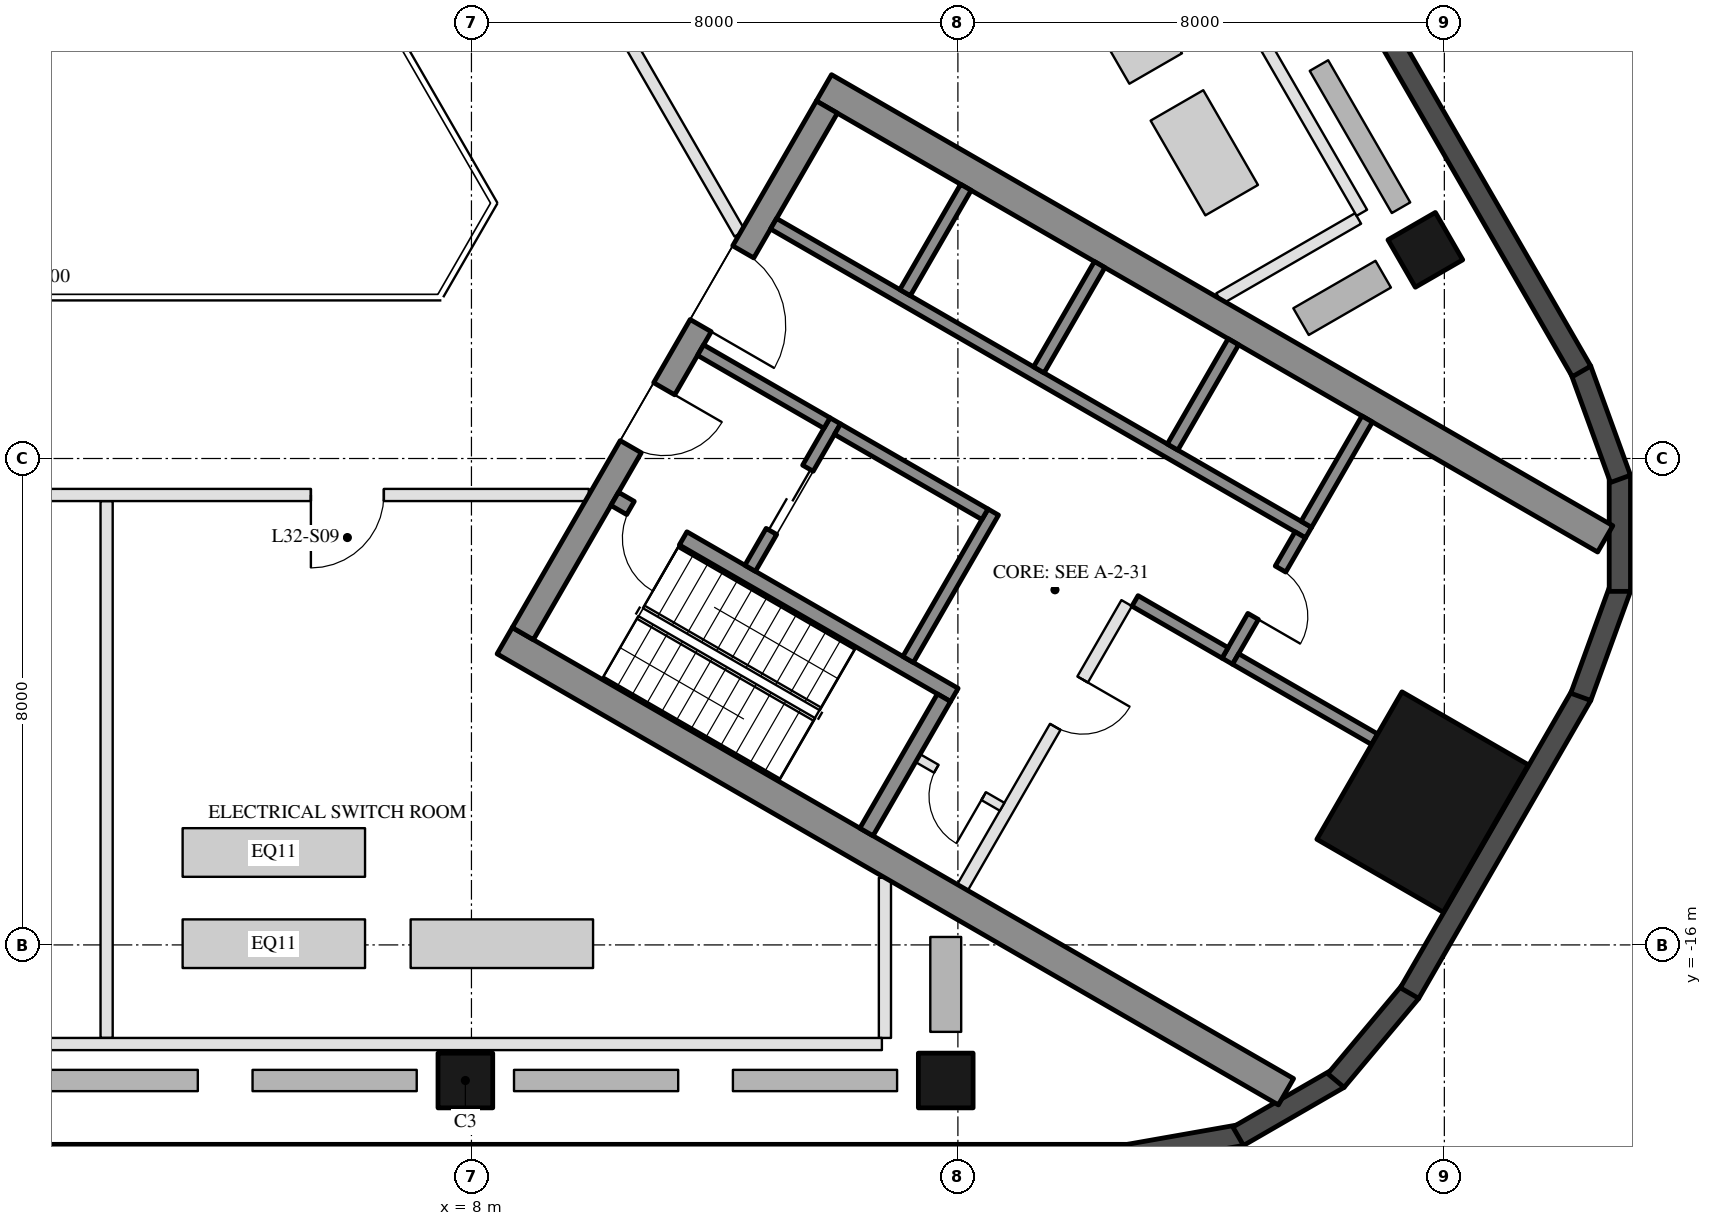
"""IFC4 building model, lengths in metres.
Left out: names, types, materials, properties, quantities, classifications, styles, units other than length and angle.
Written with IfcOpenShell. Run it as: python <this file> out.ifc"""

import sys

from ifc_helpers import new_model, si_unit, direction, frame, frame_2d, origin, origin_2d, place, context, subcontext, project, spatial, rectangle, hollow_rectangle, extrude, element, fill, save


model = new_model("IFC4")
c1 = context("Model", 3, precision=1e-05, world=origin(), true_north=direction((0.0, 1.0)))
c2 = subcontext(c1, "Body", "Model", "MODEL_VIEW")
j1 = project(units=[si_unit("LENGTHUNIT", "METRE"), si_unit("PLANEANGLEUNIT", "RADIAN")], contexts=[c1])
p1 = place(None, origin())
s1 = spatial("IfcSite", under=j1, at=p1, CompositionType="ELEMENT")
p2 = place(p1, origin())
s2 = spatial("IfcBuilding", under=s1, at=p2, CompositionType="ELEMENT")
p3 = place(p2, frame((0.0, 0.0, 137.6)))
s3 = spatial("IfcBuildingStorey", under=s2, at=p3, CompositionType="ELEMENT", Elevation=137.6)
for number, where, z_axis, x_axis in (
    (1, (7.9, -18.23, 0.0), (0.0, 0.0, 1.0), (-1.0, 0.0, 0.0)),
    (2, (15.8, -18.23, 0.0), (0.0, 0.0, 1.0), (-1.0, 0.0, 0.0)),
    (3, (23.688, -4.568, 0.0), (0.0, 0.0, 1.0), (-0.5, 0.866, 0.0)),
):
    element("IfcColumn", number, at=place(p3, frame(where, z_axis=z_axis, x_axis=x_axis)), inside=s3, PredefinedType="COLUMN", context=c2, shape_type="SweptSolid", body=[
        extrude(hollow_rectangle(XDim=0.9, YDim=0.9, WallThickness=0.04, at=origin_2d()), origin(), (0.0, 0.0, 1.0), 4.5),
    ])
p4 = place(p3, frame((23.643, -13.65, 0.0), z_axis=(0.0, 0.0, 1.0), x_axis=(0.5, 0.866025403784, 0.0)))
e4 = element("IfcColumn", 4, at=p4, inside=s3, PredefinedType="COLUMN", context=c2, shape_type="SweptSolid", body=[
    extrude(hollow_rectangle(XDim=2.8, YDim=2.4, WallThickness=0.07, at=origin_2d()), origin(), (0.0, 0.0, 1.0), 4.5),
])
p5 = place(p3, frame((-18.816, -19.455, 0.0), z_axis=(0.0, 0.0, 1.0), x_axis=(1.0, 0.0, 0.0)))
e5 = element("IfcWall", 5, at=p5, inside=s3, PredefinedType="SOLIDWALL", context=c2, shape_type="SweptSolid", body=[
    extrude(rectangle(XDim=37.632, YDim=0.35, at=frame_2d((18.816, 0.0))), origin(), (0.0, 0.0, 1.0), 4.2),
])
p6 = place(p3, frame((18.785, -19.458, 0.0), z_axis=(0.0, 0.0, 1.0), x_axis=(0.984798995425, 0.173697837091, 0.0)))
e6 = element("IfcWall", 6, at=p6, inside=s3, PredefinedType="SOLIDWALL", context=c2, shape_type="SweptSolid", body=[
    extrude(rectangle(XDim=1.91, YDim=0.35, at=frame_2d((0.955, 0.0))), origin(), (0.0, 0.0, 1.0), 4.2),
])
for number, where, z_axis, x_axis in (
    (7, (20.61, -19.147, 0.0), (0.0, 0.0, 1.0), (0.866, 0.5, 0.0)),
    (8, (22.217, -18.231, 0.0), (0.0, 0.0, 1.0), (0.643, 0.766, 0.0)),
):
    element("IfcWall", number, at=place(p3, frame(where, z_axis=z_axis, x_axis=x_axis)), inside=s3, PredefinedType="SOLIDWALL", context=c2, shape_type="SweptSolid", body=[
        extrude(rectangle(XDim=1.91, YDim=0.35, at=frame_2d((0.955, 0.0))), origin(), (0.0, 0.0, 1.0), 4.2),
    ])
p7 = place(p3, frame((23.427, -16.792, 0.0), z_axis=(0.0, 0.0, 1.0), x_axis=(0.499986410639, 0.866033249463, 0.0)))
e9 = element("IfcWall", 9, at=p7, inside=s3, PredefinedType="SOLIDWALL", context=c2, shape_type="SweptSolid", body=[
    extrude(rectangle(XDim=5.658, YDim=0.35, at=frame_2d((2.829, 0.0))), origin(), (0.0, 0.0, 1.0), 4.2),
])
for number, where, z_axis, x_axis in (
    (10, (26.244, -11.92, 0.0), (0.0, 0.0, 1.0), (0.342, 0.94, 0.0)),
    (11, (26.886, -10.185, 0.0), (0.0, 0.0, 1.0), (0.0, 1.0, 0.0)),
    (12, (26.897, -8.335, 0.0), (0.0, 0.0, 1.0), (-0.342, 0.94, 0.0)),
):
    element("IfcWall", number, at=place(p3, frame(where, z_axis=z_axis, x_axis=x_axis)), inside=s3, PredefinedType="SOLIDWALL", context=c2, shape_type="SweptSolid", body=[
        extrude(rectangle(XDim=1.91, YDim=0.35, at=frame_2d((0.955, 0.0))), origin(), (0.0, 0.0, 1.0), 4.2),
    ])
p8 = place(p3, frame((26.256, -6.567, 0.0), z_axis=(0.0, 0.0, 1.0), x_axis=(-0.499998380999, 0.866026338513, 0.0)))
e13 = element("IfcWall", 13, at=p8, inside=s3, PredefinedType="SOLIDWALL", context=c2, shape_type="SweptSolid", body=[
    extrude(rectangle(XDim=37.631, YDim=0.35, at=frame_2d((18.816, 0.0))), origin(), (0.0, 0.0, 1.0), 4.2),
])
for number, where, z_axis, x_axis in (
    (14, (8.547, -10.997, 0.0), (0.0, 0.0, 1.0), (0.866, -0.5, 0.0)),
    (15, (13.797, -1.903, 0.0), (0.0, 0.0, 1.0), (0.866, -0.5, 0.0)),
):
    element("IfcWall", number, at=place(p3, frame(where, z_axis=z_axis, x_axis=x_axis)), inside=s3, PredefinedType="SHEAR", context=c2, shape_type="SweptSolid", body=[
        extrude(rectangle(XDim=14.837, YDim=0.5, at=frame_2d((7.418, 0.0))), origin(), (0.0, 0.0, 1.0), 4.2),
    ])
p9 = place(p3, frame((8.845, -10.88, 0.0), z_axis=(0.0, 0.0, 1.0), x_axis=(0.500004234368, 0.866022959057, 0.0)))
e16 = element("IfcWall", 16, at=p9, inside=s3, PredefinedType="SHEAR", context=c2, shape_type="SweptSolid", body=[
    extrude(rectangle(XDim=10.0, YDim=0.4, at=frame_2d((5.0, 0.0))), origin(), (0.0, 0.0, 1.0), 4.2),
])
p10 = place(p9, frame((3.55, 0.0, 0.0)))
e17 = element("IfcOpeningElement", 17, at=p10, cuts=e16, PredefinedType="OPENING", context=c2, shape_type="SweptSolid", body=[
    extrude(rectangle(XDim=1.1, YDim=2.1, at=frame_2d((0.55, 1.05))), frame((0.0, 0.21, 0.0), z_axis=(0.0, -1.0, 0.0), x_axis=(1.0, 0.0, 0.0)), (0.0, 0.0, 1.0), 0.42),
])
p11 = place(p9, frame((5.85, 0.0, 0.0)))
e18 = element("IfcOpeningElement", 18, at=p11, cuts=e16, PredefinedType="OPENING", context=c2, shape_type="SweptSolid", body=[
    extrude(rectangle(XDim=1.4, YDim=2.1, at=frame_2d((0.7, 1.05))), frame((0.0, 0.21, 0.0), z_axis=(0.0, -1.0, 0.0), x_axis=(1.0, 0.0, 0.0)), (0.0, 0.0, 1.0), 0.42),
])
p12 = place(p3, frame((10.356, -8.664, 0.0), z_axis=(0.0, 0.0, 1.0), x_axis=(0.866028629588, -0.499994412703, 0.0)))
e19 = element("IfcWall", 19, at=p12, inside=s3, PredefinedType="SHEAR", context=c2, shape_type="SweptSolid", body=[
    extrude(rectangle(XDim=6.45, YDim=0.25, at=frame_2d((3.225, 0.0))), origin(), (0.0, 0.0, 1.0), 4.2),
])
p13 = place(p12, frame((0.3, 0.0, 0.0)))
e20 = element("IfcOpeningElement", 20, at=p13, cuts=e19, PredefinedType="OPENING", context=c2, shape_type="SweptSolid", body=[
    extrude(rectangle(XDim=1.0, YDim=2.1, at=frame_2d((0.5, 1.05))), frame((0.0, 0.135, 0.0), z_axis=(0.0, -1.0, 0.0), x_axis=(1.0, 0.0, 0.0)), (0.0, 0.0, 1.0), 0.27),
])
p14 = place(p3, frame((14.496, -14.143, 0.0), z_axis=(0.0, 0.0, 1.0), x_axis=(0.500062241894, 0.865989465428, 0.0)))
e21 = element("IfcWall", 21, at=p14, inside=s3, PredefinedType="SHEAR", context=c2, shape_type="SweptSolid", body=[
    extrude(rectangle(XDim=2.55, YDim=0.25, at=frame_2d((1.275, 0.0))), origin(), (0.0, 0.0, 1.0), 4.2),
])
p15 = place(p3, frame((15.181, -11.305, 0.0), z_axis=(0.0, 0.0, 1.0), x_axis=(0.49994636267, 0.866056369097, 0.0)))
e22 = element("IfcWall", 22, at=p15, inside=s3, PredefinedType="SHEAR", context=c2, shape_type="SweptSolid", body=[
    extrude(rectangle(XDim=2.8, YDim=0.2, at=frame_2d((1.4, 0.0))), origin(), (0.0, 0.0, 1.0), 4.2),
])
p16 = place(p3, frame((12.583, -9.805, 0.0), z_axis=(0.0, 0.0, 1.0), x_axis=(0.49994636267, 0.866056369097, 0.0)))
e23 = element("IfcWall", 23, at=p16, inside=s3, PredefinedType="SHEAR", context=c2, shape_type="SweptSolid", body=[
    extrude(rectangle(XDim=2.8, YDim=0.2, at=frame_2d((1.4, 0.0))), origin(), (0.0, 0.0, 1.0), 4.2),
])
p17 = place(p16, frame((0.7, 0.0, 0.0)))
e24 = element("IfcOpeningElement", 24, at=p17, cuts=e23, PredefinedType="OPENING", context=c2, shape_type="SweptSolid", body=[
    extrude(rectangle(XDim=1.2, YDim=2.1, at=frame_2d((0.6, 1.05))), frame((0.0, 0.11, 0.0), z_axis=(0.0, -1.0, 0.0), x_axis=(1.0, 0.0, 0.0)), (0.0, 0.0, 1.0), 0.22),
])
p18 = place(p3, frame((11.768, -6.217, 0.0), z_axis=(0.0, 0.0, 1.0), x_axis=(0.866050077142, -0.499957262057, 0.0)))
e25 = element("IfcWall", 25, at=p18, inside=s3, PredefinedType="SHEAR", context=c2, shape_type="SweptSolid", body=[
    extrude(rectangle(XDim=2.4, YDim=0.2, at=frame_2d((1.2, 0.0))), origin(), (0.0, 0.0, 1.0), 4.2),
])
p19 = place(p3, frame((14.02, -7.517, 0.0), z_axis=(0.0, 0.0, 1.0), x_axis=(0.866034573852, -0.49998411664, 0.0)))
e26 = element("IfcWall", 26, at=p19, inside=s3, PredefinedType="SHEAR", context=c2, shape_type="SweptSolid", body=[
    extrude(rectangle(XDim=2.8, YDim=0.2, at=frame_2d((1.4, 0.0))), origin(), (0.0, 0.0, 1.0), 4.2),
])
p20 = place(p3, frame((12.968, -4.138, 0.0), z_axis=(0.0, 0.0, 1.0), x_axis=(0.866028328073, -0.49999493495, 0.0)))
e27 = element("IfcWall", 27, at=p20, inside=s3, PredefinedType="SHEAR", context=c2, shape_type="SweptSolid", body=[
    extrude(rectangle(XDim=10.16, YDim=0.2, at=frame_2d((5.08, 0.0))), origin(), (0.0, 0.0, 1.0), 4.2),
])
p21 = place(p3, frame((20.43, -11.333, 0.0), z_axis=(0.0, 0.0, 1.0), x_axis=(0.500001309137, 0.866024647952, 0.0)))
e28 = element("IfcWall", 28, at=p21, inside=s3, PredefinedType="SHEAR", context=c2, shape_type="SweptSolid", body=[
    extrude(rectangle(XDim=2.4, YDim=0.2, at=frame_2d((1.2, 0.0))), origin(), (0.0, 0.0, 1.0), 4.2),
])
p22 = place(p21, frame((0.85, 0.0, 0.0)))
e29 = element("IfcOpeningElement", 29, at=p22, cuts=e28, PredefinedType="OPENING", context=c2, shape_type="SweptSolid", body=[
    extrude(rectangle(XDim=0.9, YDim=2.1, at=frame_2d((0.45, 1.05))), frame((0.0, 0.11, 0.0), z_axis=(0.0, -1.0, 0.0), x_axis=(1.0, 0.0, 0.0)), (0.0, 0.0, 1.0), 0.22),
])
p23 = place(p3, frame((18.913, -10.342, 0.0), z_axis=(0.0, 0.0, 1.0), x_axis=(0.866038183914, -0.499977863513, 0.0)))
e30 = element("IfcWall", 30, at=p23, inside=s3, PredefinedType="SHEAR", context=c2, shape_type="SweptSolid", body=[
    extrude(rectangle(XDim=1.71, YDim=0.2, at=frame_2d((0.855, 0.0))), origin(), (0.0, 0.0, 1.0), 4.2),
])
for number, where, z_axis, x_axis in (
    (31, (15.131, -5.272, 0.0), (0.0, 0.0, 1.0), (0.5, 0.866, 0.0)),
    (32, (17.331, -6.542, 0.0), (0.0, 0.0, 1.0), (0.5, 0.866, 0.0)),
    (33, (19.531, -7.812, 0.0), (0.0, 0.0, 1.0), (0.5, 0.866, 0.0)),
    (34, (21.73, -9.082, 0.0), (0.0, 0.0, 1.0), (0.5, 0.866, 0.0)),
):
    element("IfcWall", number, at=place(p3, frame(where, z_axis=z_axis, x_axis=x_axis)), inside=s3, PredefinedType="SHEAR", context=c2, shape_type="SweptSolid", body=[
        extrude(rectangle(XDim=2.0, YDim=0.2, at=frame_2d((1.0, 0.0))), origin(), (0.0, 0.0, 1.0), 4.2),
    ])
p24 = place(p3, frame((20.567, -11.297, 0.0), z_axis=(0.0, 0.0, 1.0), x_axis=(0.866060851709, -0.499938597367, 0.0)))
e35 = element("IfcWall", 35, at=p24, inside=s3, PredefinedType="SHEAR", context=c2, shape_type="SweptSolid", body=[
    extrude(rectangle(XDim=2.64, YDim=0.2, at=frame_2d((1.32, 0.0))), origin(), (0.0, 0.0, 1.0), 4.2),
])
p25 = place(p3, frame((16.076, -15.055, 0.0), z_axis=(0.0, 0.0, 1.0), x_axis=(0.499995103361, 0.866028230842, 0.0)))
e36 = element("IfcWall", 36, at=p25, inside=s3, PredefinedType="PARTITIONING", context=c2, shape_type="SweptSolid", body=[
    extrude(rectangle(XDim=5.4, YDim=0.2, at=frame_2d((2.7, 0.0))), origin(), (0.0, 0.0, 1.0), 4.2),
])
p26 = place(p25, frame((3.05, 0.0, 0.0)))
e37 = element("IfcOpeningElement", 37, at=p26, cuts=e36, PredefinedType="OPENING", context=c2, shape_type="SweptSolid", body=[
    extrude(rectangle(XDim=0.9, YDim=2.1, at=frame_2d((0.45, 1.05))), frame((0.0, 0.11, 0.0), z_axis=(0.0, -1.0, 0.0), x_axis=(1.0, 0.0, 0.0)), (0.0, 0.0, 1.0), 0.22),
])
p27 = place(p3, frame((15.342, -12.928, 0.0), z_axis=(0.0, 0.0, 1.0), x_axis=(0.865989903783, -0.500061482766, 0.0)))
e38 = element("IfcWall", 38, at=p27, inside=s3, PredefinedType="PARTITIONING", context=c2, shape_type="SweptSolid", body=[
    extrude(rectangle(XDim=1.6, YDim=0.15, at=frame_2d((0.8, 0.0))), origin(), (0.0, 0.0, 1.0), 4.2),
])
p28 = place(p27, frame((0.35, 0.0, 0.0)))
e39 = element("IfcOpeningElement", 39, at=p28, cuts=e38, PredefinedType="OPENING", context=c2, shape_type="SweptSolid", body=[
    extrude(rectangle(XDim=0.9, YDim=2.1, at=frame_2d((0.45, 1.05))), frame((0.0, 0.085, 0.0), z_axis=(0.0, -1.0, 0.0), x_axis=(1.0, 0.0, 0.0)), (0.0, 0.0, 1.0), 0.17),
])
p29 = place(p3, frame((2.0, -17.53, 0.0), z_axis=(0.0, 0.0, 1.0), x_axis=(0.0, 1.0, 0.0)))
e40 = element("IfcWall", 40, at=p29, inside=s3, PredefinedType="PARTITIONING", context=c2, shape_type="SweptSolid", body=[
    extrude(rectangle(XDim=8.83, YDim=0.2, at=frame_2d((4.415, 0.0))), origin(), (0.0, 0.0, 1.0), 4.2),
])
p30 = place(p3, frame((14.8, -17.53, 0.0), z_axis=(0.0, 0.0, 1.0), x_axis=(0.0, 1.0, 0.0)))
e41 = element("IfcWall", 41, at=p30, inside=s3, PredefinedType="PARTITIONING", context=c2, shape_type="SweptSolid", body=[
    extrude(rectangle(XDim=2.635, YDim=0.2, at=frame_2d((1.317, 0.0))), origin(), (0.0, 0.0, 1.0), 4.2),
])
p31 = place(p3, frame((-14.75, -17.63, 0.0), z_axis=(0.0, 0.0, 1.0), x_axis=(1.0, 0.0, 0.0)))
e42 = element("IfcWall", 42, at=p31, inside=s3, PredefinedType="PARTITIONING", context=c2, shape_type="SweptSolid", body=[
    extrude(rectangle(XDim=29.5, YDim=0.2, at=frame_2d((14.75, 0.0))), origin(), (0.0, 0.0, 1.0), 3.41),
])
p32 = place(p3, frame((-9.93, -8.6, 0.0), z_axis=(0.0, 0.0, 1.0), x_axis=(1.0, 0.0, 0.0)))
e43 = element("IfcWall", 43, at=p32, inside=s3, PredefinedType="PARTITIONING", context=c2, shape_type="SweptSolid", body=[
    extrude(rectangle(XDim=19.861, YDim=0.2, at=frame_2d((9.93, 0.0))), origin(), (0.0, 0.0, 1.0), 3.41),
])
p33 = place(p32, frame((1.871, 0.0, 0.0)))
e44 = element("IfcOpeningElement", 44, at=p33, cuts=e43, PredefinedType="OPENING", context=c2, shape_type="SweptSolid", body=[
    extrude(rectangle(XDim=1.2, YDim=2.1, at=frame_2d((0.6, 1.05))), frame((0.0, 0.11, 0.0), z_axis=(0.0, -1.0, 0.0), x_axis=(1.0, 0.0, 0.0)), (0.0, 0.0, 1.0), 0.22),
])
p34 = place(p32, frame((7.831, 0.0, 0.0)))
e45 = element("IfcOpeningElement", 45, at=p34, cuts=e43, PredefinedType="OPENING", context=c2, shape_type="SweptSolid", body=[
    extrude(rectangle(XDim=1.2, YDim=2.1, at=frame_2d((0.6, 1.05))), frame((0.0, 0.11, 0.0), z_axis=(0.0, -1.0, 0.0), x_axis=(1.0, 0.0, 0.0)), (0.0, 0.0, 1.0), 0.22),
])
p35 = place(p32, frame((15.29, 0.0, 0.0)))
e46 = element("IfcOpeningElement", 46, at=p35, cuts=e43, PredefinedType="OPENING", context=c2, shape_type="SweptSolid", body=[
    extrude(rectangle(XDim=1.2, YDim=2.1, at=frame_2d((0.6, 1.05))), frame((0.0, 0.11, 0.0), z_axis=(0.0, -1.0, 0.0), x_axis=(1.0, 0.0, 0.0)), (0.0, 0.0, 1.0), 0.22),
])
p36 = place(p3, frame((22.581, -4.052, 0.0), z_axis=(0.0, 0.0, 1.0), x_axis=(-0.866038977738, -0.499976488486, 0.0)))
e47 = element("IfcWall", 47, at=p36, inside=s3, PredefinedType="PARTITIONING", context=c2, shape_type="SweptSolid", body=[
    extrude(rectangle(XDim=2.635, YDim=0.2, at=frame_2d((1.317, 0.0))), origin(), (0.0, 0.0, 1.0), 4.2),
])
p37 = place(p3, frame((22.643, -3.959, 0.0), z_axis=(0.0, 0.0, 1.0), x_axis=(-0.499998500593, 0.866026269466, 0.0)))
e48 = element("IfcWall", 48, at=p37, inside=s3, PredefinedType="PARTITIONING", context=c2, shape_type="SweptSolid", body=[
    extrude(rectangle(XDim=29.5, YDim=0.2, at=frame_2d((14.75, 0.0))), origin(), (0.0, 0.0, 1.0), 3.41),
])
p38 = place(p3, frame((12.413, -4.3, 0.0), z_axis=(0.0, 0.0, 1.0), x_axis=(-0.50000478328, 0.866022642139, 0.0)))
e49 = element("IfcWall", 49, at=p38, inside=s3, PredefinedType="PARTITIONING", context=c2, shape_type="SweptSolid", body=[
    extrude(rectangle(XDim=19.861, YDim=0.2, at=frame_2d((9.931, 0.0))), origin(), (0.0, 0.0, 1.0), 3.41),
])
p39 = place(p38, frame((3.621, 0.0, 0.0)))
e50 = element("IfcOpeningElement", 50, at=p39, cuts=e49, PredefinedType="OPENING", context=c2, shape_type="SweptSolid", body=[
    extrude(rectangle(XDim=1.2, YDim=2.1, at=frame_2d((0.6, 1.05))), frame((0.0, 0.11, 0.0), z_axis=(0.0, -1.0, 0.0), x_axis=(1.0, 0.0, 0.0)), (0.0, 0.0, 1.0), 0.22),
])
p40 = place(p38, frame((10.831, 0.0, 0.0)))
e51 = element("IfcOpeningElement", 51, at=p40, cuts=e49, PredefinedType="OPENING", context=c2, shape_type="SweptSolid", body=[
    extrude(rectangle(XDim=1.2, YDim=2.1, at=frame_2d((0.6, 1.05))), frame((0.0, 0.11, 0.0), z_axis=(0.0, -1.0, 0.0), x_axis=(1.0, 0.0, 0.0)), (0.0, 0.0, 1.0), 0.22),
])
p41 = place(p38, frame((16.54, 0.0, 0.0)))
e52 = element("IfcOpeningElement", 52, at=p41, cuts=e49, PredefinedType="OPENING", context=c2, shape_type="SweptSolid", body=[
    extrude(rectangle(XDim=1.2, YDim=2.1, at=frame_2d((0.6, 1.05))), frame((0.0, 0.11, 0.0), z_axis=(0.0, -1.0, 0.0), x_axis=(1.0, 0.0, 0.0)), (0.0, 0.0, 1.0), 0.22),
])
p42 = place(p17, origin())
e53 = element("IfcDoor", 53, at=p42, inside=s3, OperationType="DOUBLE_DOOR_SLIDING", PredefinedType="DOOR", context=c2, shape_type="SweptSolid", body=[
    extrude(rectangle(XDim=1.2, YDim=2.1, at=frame_2d((0.6, 1.05))), frame((0.0, 0.025, 0.0), z_axis=(0.0, -1.0, 0.0), x_axis=(1.0, 0.0, 0.0)), (0.0, 0.0, 1.0), 0.05),
])
fill(e24, e53)
p43 = place(p28, frame((0.9, 0.0, 0.0), z_axis=(0.0, 0.0, 1.0), x_axis=(-1.0, 0.0, 0.0)))
e54 = element("IfcDoor", 54, at=p43, inside=s3, OperationType="SINGLE_SWING_LEFT", PredefinedType="DOOR", context=c2, shape_type="SweptSolid", body=[
    extrude(rectangle(XDim=0.9, YDim=2.1, at=frame_2d((0.45, 1.05))), frame((0.0, 0.025, 0.0), z_axis=(0.0, -1.0, 0.0), x_axis=(1.0, 0.0, 0.0)), (0.0, 0.0, 1.0), 0.05),
])
fill(e39, e54)
p44 = place(p22, frame((0.9, 0.0, 0.0), z_axis=(0.0, 0.0, 1.0), x_axis=(-1.0, 0.0, 0.0)))
e55 = element("IfcDoor", 55, at=p44, inside=s3, OperationType="SINGLE_SWING_RIGHT", PredefinedType="DOOR", context=c2, shape_type="SweptSolid", body=[
    extrude(rectangle(XDim=0.9, YDim=2.1, at=frame_2d((0.45, 1.05))), frame((0.0, 0.025, 0.0), z_axis=(0.0, -1.0, 0.0), x_axis=(1.0, 0.0, 0.0)), (0.0, 0.0, 1.0), 0.05),
])
fill(e29, e55)
p45 = place(p26, frame((0.9, 0.0, 0.0), z_axis=(0.0, 0.0, 1.0), x_axis=(-1.0, 0.0, 0.0)))
e56 = element("IfcDoor", 56, at=p45, inside=s3, OperationType="SINGLE_SWING_LEFT", PredefinedType="DOOR", context=c2, shape_type="SweptSolid", body=[
    extrude(rectangle(XDim=0.9, YDim=2.1, at=frame_2d((0.45, 1.05))), frame((0.0, 0.025, 0.0), z_axis=(0.0, -1.0, 0.0), x_axis=(1.0, 0.0, 0.0)), (0.0, 0.0, 1.0), 0.05),
])
fill(e37, e56)
p46 = place(p10, frame((1.1, 0.0, 0.0), z_axis=(0.0, 0.0, 1.0), x_axis=(-1.0, 0.0, 0.0)))
e57 = element("IfcDoor", 57, at=p46, inside=s3, OperationType="SINGLE_SWING_LEFT", PredefinedType="DOOR", context=c2, shape_type="SweptSolid", body=[
    extrude(rectangle(XDim=1.1, YDim=2.1, at=frame_2d((0.55, 1.05))), frame((0.0, 0.025, 0.0), z_axis=(0.0, -1.0, 0.0), x_axis=(1.0, 0.0, 0.0)), (0.0, 0.0, 1.0), 0.05),
])
fill(e17, e57)
p47 = place(p11, frame((1.4, 0.0, 0.0), z_axis=(0.0, 0.0, 1.0), x_axis=(-1.0, 0.0, 0.0)))
e58 = element("IfcDoor", 58, at=p47, inside=s3, OperationType="DOUBLE_DOOR_SINGLE_SWING", PredefinedType="DOOR", context=c2, shape_type="SweptSolid", body=[
    extrude(rectangle(XDim=1.4, YDim=2.1, at=frame_2d((0.7, 1.05))), frame((0.0, 0.025, 0.0), z_axis=(0.0, -1.0, 0.0), x_axis=(1.0, 0.0, 0.0)), (0.0, 0.0, 1.0), 0.05),
])
fill(e18, e58)
p48 = place(p13, frame((1.0, 0.0, 0.0), z_axis=(0.0, 0.0, 1.0), x_axis=(-1.0, 0.0, 0.0)))
e59 = element("IfcDoor", 59, at=p48, inside=s3, OperationType="SINGLE_SWING_LEFT", PredefinedType="DOOR", context=c2, shape_type="SweptSolid", body=[
    extrude(rectangle(XDim=1.0, YDim=2.1, at=frame_2d((0.5, 1.05))), frame((0.0, 0.025, 0.0), z_axis=(0.0, -1.0, 0.0), x_axis=(1.0, 0.0, 0.0)), (0.0, 0.0, 1.0), 0.05),
])
fill(e20, e59)
p49 = place(p35, frame((1.2, 0.0, 0.0), z_axis=(0.0, 0.0, 1.0), x_axis=(-1.0, 0.0, 0.0)))
e60 = element("IfcDoor", 60, at=p49, inside=s3, OperationType="SINGLE_SWING_RIGHT", PredefinedType="DOOR", context=c2, shape_type="SweptSolid", body=[
    extrude(rectangle(XDim=1.2, YDim=2.1, at=frame_2d((0.6, 1.05))), frame((0.0, 0.025, 0.0), z_axis=(0.0, -1.0, 0.0), x_axis=(1.0, 0.0, 0.0)), (0.0, 0.0, 1.0), 0.05),
])
fill(e46, e60)
save(model, sys.argv[1])
